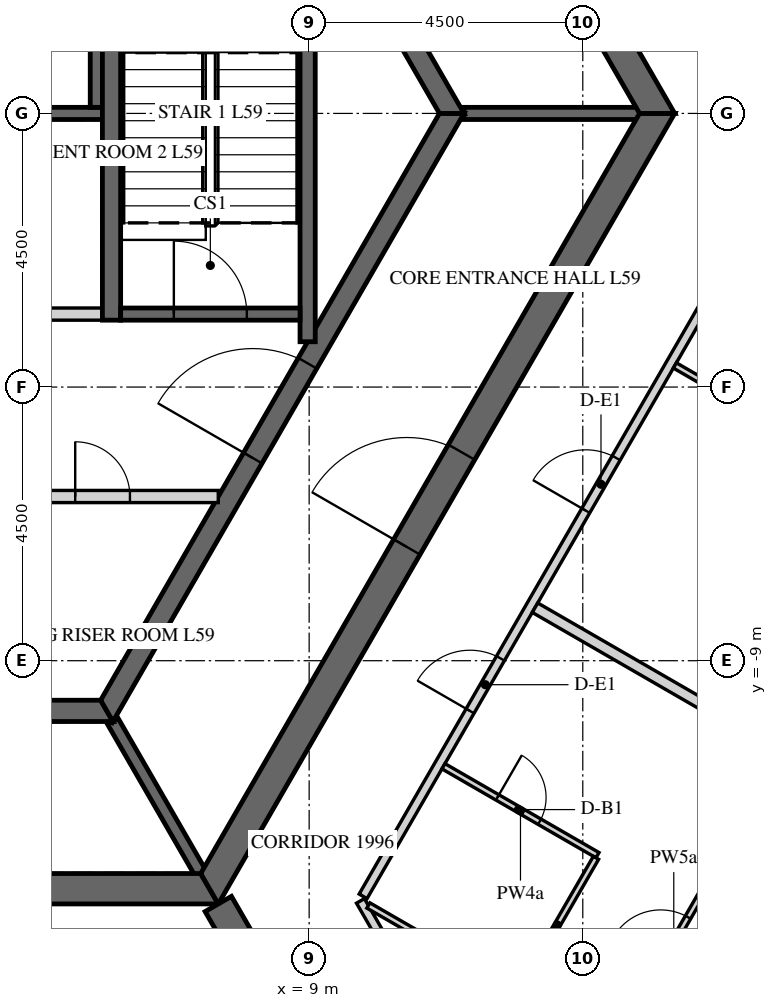
"""IFC4 building model, lengths in metres.
Left out: names, types, materials, properties, quantities, classifications, styles, units other than length and angle.
Written with IfcOpenShell. Run it as: python <this file> out.ifc"""

import sys

from ifc_helpers import new_model, si_unit, direction, frame, frame_2d, origin, place, context, subcontext, project, spatial, polyline, rectangle, outline, extrude, element, fill, save


model = new_model("IFC4")
c1 = context("Model", 3, precision=1e-05, world=origin(), true_north=direction((0.0, 1.0)))
c2 = subcontext(c1, "Body", "Model", "MODEL_VIEW")
j1 = project(units=[si_unit("LENGTHUNIT", "METRE"), si_unit("PLANEANGLEUNIT", "RADIAN")], contexts=[c1])
p1 = place(None, origin())
s1 = spatial("IfcSite", under=j1, at=p1, CompositionType="ELEMENT")
p2 = place(p1, origin())
s2 = spatial("IfcBuilding", under=s1, at=p2, CompositionType="ELEMENT")
p3 = place(p2, frame((0.0, 0.0, 246.3)))
s3 = spatial("IfcBuildingStorey", under=s2, at=p3, CompositionType="ELEMENT", Elevation=246.3)
p4 = place(p3, frame((-7.361, -12.75, -0.15), z_axis=(0.0, 0.0, 1.0), x_axis=(1.0, 0.0, 0.0)))
e1 = element("IfcWall", 1, at=p4, inside=s3, PredefinedType="SHEAR", context=c2, shape_type="SweptSolid", body=[
    extrude(outline(polyline([(-0.144, -0.25), (14.866, -0.25), (14.578, 0.25), (0.144, 0.25), (-0.144, -0.25)])), origin(), (0.0, 0.0, 1.0), 3.75),
])
p5 = place(p4, frame((6.761, 0.0, 0.15)))
e2 = element("IfcOpeningElement", 2, at=p5, cuts=e1, PredefinedType="OPENING", context=c2, shape_type="SweptSolid", body=[
    extrude(rectangle(XDim=1.2, YDim=2.4, at=frame_2d((0.6, 1.2))), frame((0.0, 0.26, 0.0), z_axis=(0.0, -1.0, 0.0), x_axis=(1.0, 0.0, 0.0)), (0.0, 0.0, 1.0), 0.52),
])
p6 = place(p3, frame((7.361, -12.75, -0.15), z_axis=(0.0, 0.0, 1.0), x_axis=(0.50000571537, 0.866022103989, 0.0)))
e3 = element("IfcWall", 3, at=p6, inside=s3, PredefinedType="SHEAR", context=c2, shape_type="SweptSolid", body=[
    extrude(outline(polyline([(-0.144, -0.25), (14.867, -0.25), (14.578, 0.25), (0.144, 0.25), (-0.144, -0.25)])), origin(), (0.0, 0.0, 1.0), 3.75),
])
p7 = place(p6, frame((6.49, 0.0, 0.15)))
e4 = element("IfcOpeningElement", 4, at=p7, cuts=e3, PredefinedType="OPENING", context=c2, shape_type="SweptSolid", body=[
    extrude(rectangle(XDim=1.8, YDim=2.4, at=frame_2d((0.9, 1.2))), frame((0.0, 0.26, 0.0), z_axis=(0.0, -1.0, 0.0), x_axis=(1.0, 0.0, 0.0)), (0.0, 0.0, 1.0), 0.52),
])
p8 = place(p3, frame((14.722, 0.0, -0.15), z_axis=(0.0, 0.0, 1.0), x_axis=(-0.50000571537, 0.866022103989, 0.0)))
e5 = element("IfcWall", 5, at=p8, inside=s3, PredefinedType="SHEAR", context=c2, shape_type="SweptSolid", body=[
    extrude(outline(polyline([(-0.144, -0.25), (14.867, -0.25), (14.578, 0.25), (0.144, 0.25), (-0.144, -0.25)])), origin(), (0.0, 0.0, 1.0), 3.75),
])
p9 = place(p8, frame((6.432, 0.0, 0.15)))
e6 = element("IfcOpeningElement", 6, at=p9, cuts=e5, PredefinedType="OPENING", context=c2, shape_type="SweptSolid", body=[
    extrude(rectangle(XDim=1.8, YDim=2.4, at=frame_2d((0.9, 1.2))), frame((0.0, 0.26, 0.0), z_axis=(0.0, -1.0, 0.0), x_axis=(1.0, 0.0, 0.0)), (0.0, 0.0, 1.0), 0.52),
])
p10 = place(p3, frame((7.506, -13.0, -0.15), z_axis=(0.0, 0.0, 1.0), x_axis=(0.499988271576, -0.866032175087, 0.0)))
e7 = element("IfcWall", 7, at=p10, inside=s3, PredefinedType="SHEAR", context=c2, shape_type="SweptSolid", body=[
    extrude(rectangle(XDim=15.424, YDim=0.5, at=frame_2d((7.712, 0.0))), origin(), (0.0, 0.0, 1.0), 3.75),
])
p11 = place(p10, frame((6.812, 0.0, 0.15)))
e8 = element("IfcOpeningElement", 8, at=p11, cuts=e7, PredefinedType="OPENING", context=c2, shape_type="SweptSolid", body=[
    extrude(rectangle(XDim=1.8, YDim=2.4, at=frame_2d((0.9, 1.2))), frame((0.0, 0.26, 0.0), z_axis=(0.0, -1.0, 0.0), x_axis=(1.0, 0.0, 0.0)), (0.0, 0.0, 1.0), 0.52),
])
p12 = place(p3, frame((-5.673, -9.825, -0.15), z_axis=(0.0, 0.0, 1.0), x_axis=(1.0, 0.0, 0.0)))
e9 = element("IfcWall", 9, at=p12, inside=s3, PredefinedType="SHEAR", context=c2, shape_type="SweptSolid", body=[
    extrude(outline(polyline([(-0.101, -0.175), (11.446, -0.175), (11.244, 0.175), (0.101, 0.175), (-0.101, -0.175)])), origin(), (0.0, 0.0, 1.0), 3.75),
])
p13 = place(p3, frame((5.673, -9.825, -0.15), z_axis=(0.0, 0.0, 1.0), x_axis=(0.499995046907, 0.866028263435, 0.0)))
e10 = element("IfcWall", 10, at=p13, inside=s3, PredefinedType="SHEAR", context=c2, shape_type="SweptSolid", body=[
    extrude(outline(polyline([(-0.101, -0.175), (11.446, -0.175), (11.244, 0.175), (0.101, 0.175), (-0.101, -0.175)])), origin(), (0.0, 0.0, 1.0), 3.75),
])
p14 = place(p13, frame((4.801, 0.0, 0.15)))
e11 = element("IfcOpeningElement", 11, at=p14, cuts=e10, PredefinedType="OPENING", context=c2, shape_type="SweptSolid", body=[
    extrude(rectangle(XDim=1.8, YDim=2.4, at=frame_2d((0.9, 1.2))), frame((0.0, 0.185, 0.0), z_axis=(0.0, -1.0, 0.0), x_axis=(1.0, 0.0, 0.0)), (0.0, 0.0, 1.0), 0.37),
])
p15 = place(p3, frame((11.345, 0.0, -0.15), z_axis=(0.0, 0.0, 1.0), x_axis=(-0.499995046907, 0.866028263435, 0.0)))
e12 = element("IfcWall", 12, at=p15, inside=s3, PredefinedType="SHEAR", context=c2, shape_type="SweptSolid", body=[
    extrude(outline(polyline([(-0.101, -0.175), (11.446, -0.175), (11.244, 0.175), (0.101, 0.175), (-0.101, -0.175)])), origin(), (0.0, 0.0, 1.0), 3.75),
])
p16 = place(p15, frame((4.744, 0.0, 0.15)))
e13 = element("IfcOpeningElement", 13, at=p16, cuts=e12, PredefinedType="OPENING", context=c2, shape_type="SweptSolid", body=[
    extrude(rectangle(XDim=1.8, YDim=2.4, at=frame_2d((0.9, 1.2))), frame((0.0, 0.185, 0.0), z_axis=(0.0, -1.0, 0.0), x_axis=(1.0, 0.0, 0.0)), (0.0, 0.0, 1.0), 0.37),
])
p17 = place(p3, frame((-5.6, 0.0, -0.25), z_axis=(0.0, 0.0, 1.0), x_axis=(1.0, 0.0, 0.0)))
e14 = element("IfcWall", 14, at=p17, inside=s3, PredefinedType="SHEAR", context=c2, shape_type="SweptSolid", body=[
    extrude(rectangle(XDim=11.2, YDim=0.2, at=frame_2d((5.6, 0.0))), origin(), (0.0, 0.0, 1.0), 3.9),
])
p18 = place(p3, frame((5.5, 0.1, -0.25), z_axis=(0.0, 0.0, 1.0), x_axis=(0.0, 1.0, 0.0)))
e15 = element("IfcWall", 15, at=p18, inside=s3, PredefinedType="SHEAR", context=c2, shape_type="SweptSolid", body=[
    extrude(rectangle(XDim=3.1, YDim=0.2, at=frame_2d((1.55, 0.0))), origin(), (0.0, 0.0, 1.0), 3.9),
])
p19 = place(p3, frame((2.75, -3.3, 0.0), z_axis=(0.0, 0.0, 1.0), x_axis=(1.0, 0.0, 0.0)))
e16 = element("IfcWall", 16, at=p19, inside=s3, PredefinedType="PARTITIONING", context=c2, shape_type="SweptSolid", body=[
    extrude(rectangle(XDim=2.85, YDim=0.2, at=frame_2d((1.425, 0.0))), origin(), (0.0, 0.0, 1.0), 3.65),
])
p20 = place(p19, frame((1.075, 0.0, 0.0)))
e17 = element("IfcOpeningElement", 17, at=p20, cuts=e16, PredefinedType="OPENING", context=c2, shape_type="SweptSolid", body=[
    extrude(rectangle(XDim=0.9, YDim=2.1, at=frame_2d((0.45, 1.05))), frame((0.0, 0.11, 0.0), z_axis=(0.0, -1.0, 0.0), x_axis=(1.0, 0.0, 0.0)), (0.0, 0.0, 1.0), 0.22),
])
p21 = place(p3, frame((3.7, -6.3, 0.0), z_axis=(0.0, 0.0, 1.0), x_axis=(1.0, 0.0, 0.0)))
e18 = element("IfcWall", 18, at=p21, inside=s3, PredefinedType="PARTITIONING", context=c2, shape_type="SweptSolid", body=[
    extrude(rectangle(XDim=3.806, YDim=0.2, at=frame_2d((1.903, 0.0))), origin(), (0.0, 0.0, 1.0), 3.65),
])
p22 = place(p21, frame((1.453, 0.0, 0.0)))
e19 = element("IfcOpeningElement", 19, at=p22, cuts=e18, PredefinedType="OPENING", context=c2, shape_type="SweptSolid", body=[
    extrude(rectangle(XDim=0.9, YDim=2.1, at=frame_2d((0.45, 1.05))), frame((0.0, 0.11, 0.0), z_axis=(0.0, -1.0, 0.0), x_axis=(1.0, 0.0, 0.0)), (0.0, 0.0, 1.0), 0.22),
])
for number, where, z_axis, x_axis in (
    (20, (11.547, 0.0, -0.15), (0.0, 0.0, 1.0), (1.0, 0.0, 0.0)),
    (21, (5.773, -10.0, -0.15), (0.0, 0.0, 1.0), (0.5, -0.866, 0.0)),
):
    element("IfcWall", number, at=place(p3, frame(where, z_axis=z_axis, x_axis=x_axis)), inside=s3, PredefinedType="SHEAR", context=c2, shape_type="SweptSolid", body=[
        extrude(rectangle(XDim=2.887, YDim=0.2, at=frame_2d((1.443, 0.0))), origin(), (0.0, 0.0, 1.0), 3.75),
    ])
p23 = place(p3, frame((5.75, -3.4, -0.25), z_axis=(0.0, 0.0, 1.0), x_axis=(0.0, 1.0, 0.0)))
e22 = element("IfcWall", 22, at=p23, inside=s3, PredefinedType="SHEAR", context=c2, shape_type="SweptSolid", body=[
    extrude(rectangle(XDim=6.8, YDim=0.3, at=frame_2d((3.4, 0.0))), origin(), (0.0, 0.0, 1.0), 3.9),
])
p24 = place(p3, frame((8.975, -3.755, -0.25), z_axis=(0.0, 0.0, 1.0), x_axis=(0.0, 1.0, 0.0)))
e23 = element("IfcWall", 23, at=p24, inside=s3, PredefinedType="SHEAR", context=c2, shape_type="SweptSolid", body=[
    extrude(rectangle(XDim=7.51, YDim=0.25, at=frame_2d((3.755, 0.0))), origin(), (0.0, 0.0, 1.0), 3.9),
])
p25 = place(p3, frame((5.9, -3.3, -0.25), z_axis=(0.0, 0.0, 1.0), x_axis=(1.0, 0.0, 0.0)))
e24 = element("IfcWall", 24, at=p25, inside=s3, PredefinedType="SHEAR", context=c2, shape_type="SweptSolid", body=[
    extrude(rectangle(XDim=2.95, YDim=0.2, at=frame_2d((1.475, 0.0))), origin(), (0.0, 0.0, 1.0), 3.9),
])
p26 = place(p25, frame((0.875, 0.0, 0.25)))
e25 = element("IfcOpeningElement", 25, at=p26, cuts=e24, PredefinedType="OPENING", context=c2, shape_type="SweptSolid", body=[
    extrude(rectangle(XDim=1.2, YDim=2.4, at=frame_2d((0.6, 1.2))), frame((0.0, 0.11, 0.0), z_axis=(0.0, -1.0, 0.0), x_axis=(1.0, 0.0, 0.0)), (0.0, 0.0, 1.0), 0.22),
])
p27 = place(p3, frame((13.699, -19.628, 0.0), z_axis=(0.0, 0.0, 1.0), x_axis=(-0.499993780622, 0.866028994514, 0.0)))
e26 = element("IfcWall", 26, at=p27, inside=s3, PredefinedType="PARTITIONING", context=c2, shape_type="SweptSolid", body=[
    extrude(rectangle(XDim=7.711, YDim=0.15, at=frame_2d((3.855, 0.0))), origin(), (0.0, 0.0, 1.0), 2.838),
])
p28 = place(p3, frame((9.887, -12.875, 0.0), z_axis=(0.0, 0.0, 1.0), x_axis=(0.499998228944, 0.866026426302, 0.0)))
e27 = element("IfcWall", 27, at=p28, inside=s3, PredefinedType="PARTITIONING", context=c2, shape_type="SweptSolid", body=[
    extrude(rectangle(XDim=14.867, YDim=0.15, at=frame_2d((7.433, 0.0))), origin(), (0.0, 0.0, 1.0), 2.838),
])
p29 = place(p28, frame((3.519, 0.0, 0.0)))
e28 = element("IfcOpeningElement", 28, at=p29, cuts=e27, PredefinedType="OPENING", context=c2, shape_type="SweptSolid", body=[
    extrude(rectangle(XDim=1.0, YDim=2.1, at=frame_2d((0.5, 1.05))), frame((0.0, 0.085, 0.0), z_axis=(0.0, -1.0, 0.0), x_axis=(1.0, 0.0, 0.0)), (0.0, 0.0, 1.0), 0.17),
])
p30 = place(p28, frame((7.324, 0.0, 0.0)))
e29 = element("IfcOpeningElement", 29, at=p30, cuts=e27, PredefinedType="OPENING", context=c2, shape_type="SweptSolid", body=[
    extrude(rectangle(XDim=1.0, YDim=2.1, at=frame_2d((0.5, 1.05))), frame((0.0, 0.085, 0.0), z_axis=(0.0, -1.0, 0.0), x_axis=(1.0, 0.0, 0.0)), (0.0, 0.0, 1.0), 0.17),
])
p31 = place(p28, frame((13.717, 0.0, 0.0)))
e30 = element("IfcOpeningElement", 30, at=p31, cuts=e27, PredefinedType="OPENING", context=c2, shape_type="SweptSolid", body=[
    extrude(rectangle(XDim=1.0, YDim=2.1, at=frame_2d((0.5, 1.05))), frame((0.0, 0.085, 0.0), z_axis=(0.0, -1.0, 0.0), x_axis=(1.0, 0.0, 0.0)), (0.0, 0.0, 1.0), 0.17),
])
p32 = place(p3, frame((17.277, 0.075, 0.0), z_axis=(0.0, 0.0, 1.0), x_axis=(-0.499998228944, 0.866026426302, 0.0)))
e31 = element("IfcWall", 31, at=p32, inside=s3, PredefinedType="PARTITIONING", context=c2, shape_type="SweptSolid", body=[
    extrude(rectangle(XDim=14.867, YDim=0.15, at=frame_2d((7.433, 0.0))), origin(), (0.0, 0.0, 1.0), 2.838),
])
p33 = place(p32, frame((4.345, 0.0, 0.0)))
e32 = element("IfcOpeningElement", 32, at=p33, cuts=e31, PredefinedType="OPENING", context=c2, shape_type="SweptSolid", body=[
    extrude(rectangle(XDim=1.0, YDim=2.1, at=frame_2d((0.5, 1.05))), frame((0.0, 0.085, 0.0), z_axis=(0.0, -1.0, 0.0), x_axis=(1.0, 0.0, 0.0)), (0.0, 0.0, 1.0), 0.17),
])
p34 = place(p32, frame((8.51, 0.0, 0.0)))
e33 = element("IfcOpeningElement", 33, at=p34, cuts=e31, PredefinedType="OPENING", context=c2, shape_type="SweptSolid", body=[
    extrude(rectangle(XDim=1.0, YDim=2.1, at=frame_2d((0.5, 1.05))), frame((0.0, 0.085, 0.0), z_axis=(0.0, -1.0, 0.0), x_axis=(1.0, 0.0, 0.0)), (0.0, 0.0, 1.0), 0.17),
])
p35 = place(p3, frame((11.209, -10.736, 0.0), z_axis=(0.0, 0.0, 1.0), x_axis=(0.866046596414, -0.499963291492, 0.0)))
e34 = element("IfcWall", 34, at=p35, inside=s3, PredefinedType="PARTITIONING", context=c2, shape_type="SweptSolid", body=[
    extrude(rectangle(XDim=2.925, YDim=0.1, at=frame_2d((1.462, 0.0))), origin(), (0.0, 0.0, 1.0), 2.838),
])
p36 = place(p35, frame((1.025, 0.0, 0.0)))
e35 = element("IfcOpeningElement", 35, at=p36, cuts=e34, PredefinedType="OPENING", context=c2, shape_type="SweptSolid", body=[
    extrude(rectangle(XDim=0.8, YDim=2.1, at=frame_2d((0.4, 1.05))), frame((0.0, 0.06, 0.0), z_axis=(0.0, -1.0, 0.0), x_axis=(1.0, 0.0, 0.0)), (0.0, 0.0, 1.0), 0.12),
])
p37 = place(p3, frame((13.717, -12.242, 0.0), z_axis=(0.0, 0.0, 1.0), x_axis=(-0.499990435942, -0.866030925526, 0.0)))
e36 = element("IfcWall", 36, at=p37, inside=s3, PredefinedType="PARTITIONING", context=c2, shape_type="SweptSolid", body=[
    extrude(rectangle(XDim=2.55, YDim=0.1, at=frame_2d((1.275, 0.0))), origin(), (0.0, 0.0, 1.0), 2.838),
])
p38 = place(p3, frame((12.399, -14.425, 0.0), z_axis=(0.0, 0.0, 1.0), x_axis=(-0.866018616679, 0.500011755427, 0.0)))
e37 = element("IfcWall", 37, at=p38, inside=s3, PredefinedType="PARTITIONING", context=c2, shape_type="SweptSolid", body=[
    extrude(rectangle(XDim=2.8, YDim=0.1, at=frame_2d((1.4, 0.0))), origin(), (0.0, 0.0, 1.0), 2.838),
])
p39 = place(p3, frame((13.231, -16.683, 0.0), z_axis=(0.0, 0.0, 1.0), x_axis=(0.499995846692, 0.866027801685, 0.0)))
e38 = element("IfcWall", 38, at=p39, inside=s3, PredefinedType="PARTITIONING", context=c2, shape_type="SweptSolid", body=[
    extrude(rectangle(XDim=7.06, YDim=0.1, at=frame_2d((3.53, 0.0))), origin(), (0.0, 0.0, 1.0), 2.838),
])
p40 = place(p39, frame((3.1, 0.0, 0.0)))
e39 = element("IfcOpeningElement", 39, at=p40, cuts=e38, PredefinedType="OPENING", context=c2, shape_type="SweptSolid", body=[
    extrude(rectangle(XDim=0.9, YDim=2.1, at=frame_2d((0.45, 1.05))), frame((0.0, 0.06, 0.0), z_axis=(0.0, -1.0, 0.0), x_axis=(1.0, 0.0, 0.0)), (0.0, 0.0, 1.0), 0.12),
])
p41 = place(p3, frame((23.431, -14.316, 0.0), z_axis=(0.0, 0.0, 1.0), x_axis=(-0.866024931941, 0.500000817256, 0.0)))
e40 = element("IfcWall", 40, at=p41, inside=s3, PredefinedType="PARTITIONING", context=c2, shape_type="SweptSolid", body=[
    extrude(rectangle(XDim=12.375, YDim=0.18, at=frame_2d((6.188, 0.0))), origin(), (0.0, 0.0, 1.0), 2.838),
])
p42 = place(p3, frame((17.158, -5.382, 0.0), z_axis=(0.0, 0.0, 1.0), x_axis=(-0.866031185235, 0.4999899861, 0.0)))
e41 = element("IfcWall", 41, at=p42, inside=s3, PredefinedType="PARTITIONING", context=c2, shape_type="SweptSolid", body=[
    extrude(rectangle(XDim=2.475, YDim=0.1, at=frame_2d((1.238, 0.0))), origin(), (0.0, 0.0, 1.0), 2.838),
])
p43 = place(p42, frame((0.85, 0.0, 0.0)))
e42 = element("IfcOpeningElement", 42, at=p43, cuts=e41, PredefinedType="OPENING", context=c2, shape_type="SweptSolid", body=[
    extrude(rectangle(XDim=0.8, YDim=2.1, at=frame_2d((0.4, 1.05))), frame((0.0, 0.06, 0.0), z_axis=(0.0, -1.0, 0.0), x_axis=(1.0, 0.0, 0.0)), (0.0, 0.0, 1.0), 0.12),
])
p44 = place(p7, origin())
e43 = element("IfcDoor", 43, at=p44, inside=s3, OperationType="DOUBLE_DOOR_SINGLE_SWING", PredefinedType="DOOR", context=c2, shape_type="SweptSolid", body=[
    extrude(rectangle(XDim=1.8, YDim=2.4, at=frame_2d((0.9, 1.2))), frame((0.0, 0.025, 0.0), z_axis=(0.0, -1.0, 0.0), x_axis=(1.0, 0.0, 0.0)), (0.0, 0.0, 1.0), 0.05),
])
fill(e4, e43)
p45 = place(p14, origin())
e44 = element("IfcDoor", 44, at=p45, inside=s3, OperationType="DOUBLE_DOOR_SINGLE_SWING", PredefinedType="DOOR", context=c2, shape_type="SweptSolid", body=[
    extrude(rectangle(XDim=1.8, YDim=2.4, at=frame_2d((0.9, 1.2))), frame((0.0, 0.025, 0.0), z_axis=(0.0, -1.0, 0.0), x_axis=(1.0, 0.0, 0.0)), (0.0, 0.0, 1.0), 0.05),
])
fill(e11, e44)
p46 = place(p22, origin())
e45 = element("IfcDoor", 45, at=p46, inside=s3, OperationType="SINGLE_SWING_LEFT", PredefinedType="DOOR", context=c2, shape_type="SweptSolid", body=[
    extrude(rectangle(XDim=0.9, YDim=2.1, at=frame_2d((0.45, 1.05))), frame((0.0, 0.025, 0.0), z_axis=(0.0, -1.0, 0.0), x_axis=(1.0, 0.0, 0.0)), (0.0, 0.0, 1.0), 0.05),
])
fill(e19, e45)
p47 = place(p26, origin())
e46 = element("IfcDoor", 46, at=p47, inside=s3, OperationType="SINGLE_SWING_LEFT", PredefinedType="DOOR", context=c2, shape_type="SweptSolid", body=[
    extrude(rectangle(XDim=1.2, YDim=2.4, at=frame_2d((0.6, 1.2))), frame((0.0, 0.025, 0.0), z_axis=(0.0, -1.0, 0.0), x_axis=(1.0, 0.0, 0.0)), (0.0, 0.0, 1.0), 0.05),
])
fill(e25, e46)
p48 = place(p29, origin())
e47 = element("IfcDoor", 47, at=p48, inside=s3, OperationType="SINGLE_SWING_RIGHT", PredefinedType="DOOR", context=c2, shape_type="SweptSolid", body=[
    extrude(rectangle(XDim=1.0, YDim=2.1, at=frame_2d((0.5, 1.05))), frame((0.0, 0.025, 0.0), z_axis=(0.0, -1.0, 0.0), x_axis=(1.0, 0.0, 0.0)), (0.0, 0.0, 1.0), 0.05),
])
fill(e28, e47)
p49 = place(p36, origin())
e48 = element("IfcDoor", 48, at=p49, inside=s3, OperationType="SINGLE_SWING_RIGHT", PredefinedType="DOOR", context=c2, shape_type="SweptSolid", body=[
    extrude(rectangle(XDim=0.8, YDim=2.1, at=frame_2d((0.4, 1.05))), frame((0.0, 0.025, 0.0), z_axis=(0.0, -1.0, 0.0), x_axis=(1.0, 0.0, 0.0)), (0.0, 0.0, 1.0), 0.05),
])
fill(e35, e48)
p50 = place(p40, origin())
e49 = element("IfcDoor", 49, at=p50, inside=s3, OperationType="SINGLE_SWING_LEFT", PredefinedType="DOOR", context=c2, shape_type="SweptSolid", body=[
    extrude(rectangle(XDim=0.9, YDim=2.1, at=frame_2d((0.45, 1.05))), frame((0.0, 0.025, 0.0), z_axis=(0.0, -1.0, 0.0), x_axis=(1.0, 0.0, 0.0)), (0.0, 0.0, 1.0), 0.05),
])
fill(e39, e49)
p51 = place(p30, origin())
e50 = element("IfcDoor", 50, at=p51, inside=s3, OperationType="SINGLE_SWING_LEFT", PredefinedType="DOOR", context=c2, shape_type="SweptSolid", body=[
    extrude(rectangle(XDim=1.0, YDim=2.1, at=frame_2d((0.5, 1.05))), frame((0.0, 0.025, 0.0), z_axis=(0.0, -1.0, 0.0), x_axis=(1.0, 0.0, 0.0)), (0.0, 0.0, 1.0), 0.05),
])
fill(e29, e50)
save(model, sys.argv[1])
